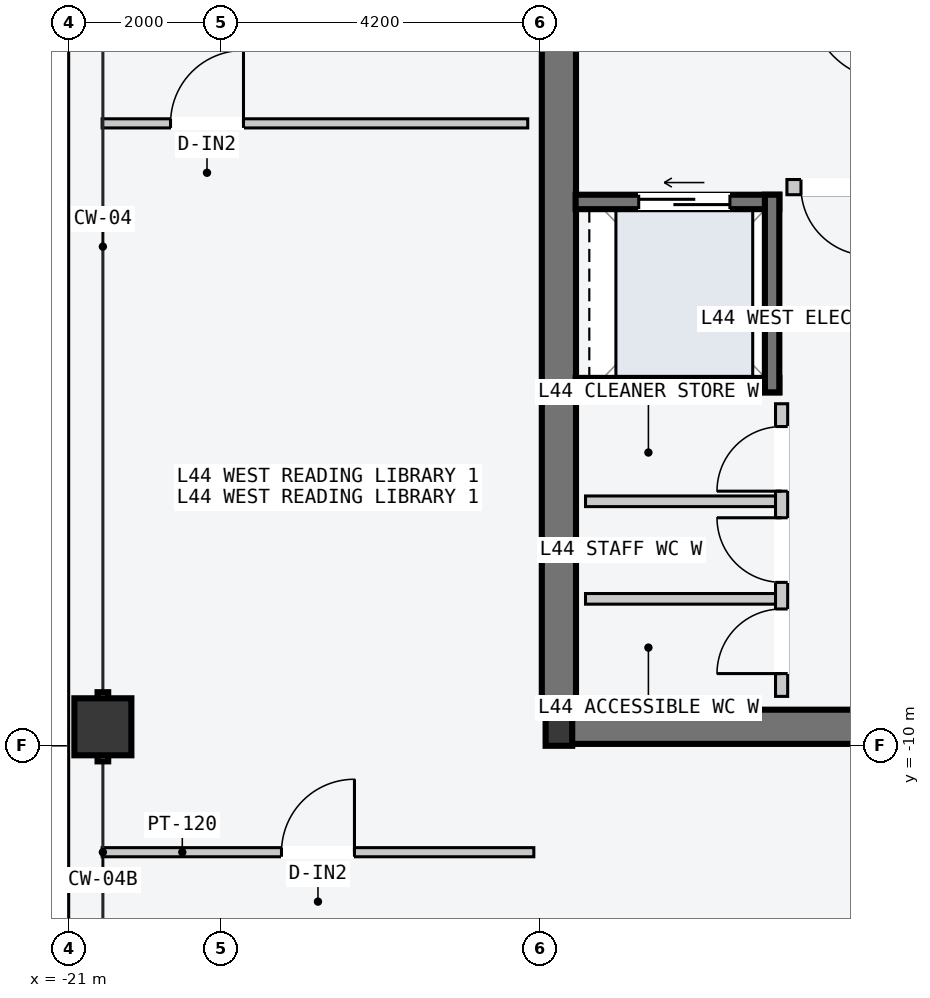
"""IFC4 building model, lengths in metres.
Left out: names, types, materials, properties, quantities, classifications, styles, units other than length and angle.
Written with IfcOpenShell. Run it as: python <this file> out.ifc"""

import sys

from ifc_helpers import new_model, si_unit, direction, frame, frame_2d, origin, origin_2d, place, context, subcontext, project, spatial, rectangle, hollow_rectangle, i_section, extrude, element, fill, save


model = new_model("IFC4")
c1 = context("Model", 3, precision=1e-05, world=origin(), true_north=direction((0.0, 1.0)))
c2 = subcontext(c1, "Body", "Model", "MODEL_VIEW")
j1 = project(units=[si_unit("LENGTHUNIT", "METRE"), si_unit("PLANEANGLEUNIT", "RADIAN")], contexts=[c1])
p1 = place(None, origin())
s1 = spatial("IfcSite", under=j1, at=p1, CompositionType="ELEMENT")
p2 = place(p1, origin())
s2 = spatial("IfcBuilding", under=s1, at=p2, CompositionType="ELEMENT")
p3 = place(p2, frame((0.0, 0.0, 169.5)))
s3 = spatial("IfcBuildingStorey", under=s2, at=p3, CompositionType="ELEMENT", Elevation=169.5)
p4 = place(p3, frame((-14.53, -9.75, -0.2), z_axis=(0.0, 0.0, 1.0), x_axis=(1.0, 0.0, 0.0)))
e1 = element("IfcWall", 1, at=p4, inside=s3, PredefinedType="SHEAR", context=c2, shape_type="SweptSolid", body=[
    extrude(rectangle(XDim=6.46, YDim=0.45, at=frame_2d((3.23, 0.0))), origin(), (0.0, 0.0, 1.0), 3.6),
])
p5 = place(p3, frame((-14.55, -9.5, -0.2), z_axis=(0.0, 0.0, 1.0), x_axis=(0.0, 1.0, 0.0)))
e2 = element("IfcWall", 2, at=p5, inside=s3, PredefinedType="SHEAR", context=c2, shape_type="SweptSolid", body=[
    extrude(rectangle(XDim=9.25, YDim=0.45, at=frame_2d((4.625, 0.0))), origin(), (0.0, 0.0, 1.0), 3.6),
])
p6 = place(p3, frame((-14.55, -9.75, 0.0), z_axis=(0.0, 0.0, 1.0), x_axis=(1.0, 0.0, 0.0)))
e3 = element("IfcColumn", 3, at=p6, inside=s3, PredefinedType="COLUMN", context=c2, shape_type="SweptSolid", body=[
    extrude(i_section(OverallWidth=0.35, OverallDepth=0.5, WebThickness=0.02, FlangeThickness=0.032, at=origin_2d()), origin(), (0.0, 0.0, 1.0), 3.6),
])
p7 = place(p3, frame((-20.55, -9.75, 0.0), z_axis=(0.0, 0.0, 1.0), x_axis=(0.0, 1.0, 0.0)))
e4 = element("IfcColumn", 4, at=p7, inside=s3, PredefinedType="COLUMN", context=c2, shape_type="SweptSolid", body=[
    extrude(hollow_rectangle(XDim=0.75, YDim=0.75, WallThickness=0.032, at=origin_2d()), origin(), (0.0, 0.0, 1.0), 3.6),
])
p8 = place(p3, frame((-14.33, -2.845, -0.2), z_axis=(0.0, 0.0, 1.0), x_axis=(1.0, 0.0, 0.0)))
e5 = element("IfcWall", 5, at=p8, inside=s3, PredefinedType="SOLIDWALL", context=c2, shape_type="SweptSolid", body=[
    extrude(rectangle(XDim=2.68, YDim=0.19, at=frame_2d((1.34, 0.0))), origin(), (0.0, 0.0, 1.0), 3.6),
])
p9 = place(p8, frame((0.83, 0.0, 0.2)))
e6 = element("IfcOpeningElement", 6, at=p9, cuts=e5, PredefinedType="OPENING", context=c2, shape_type="SweptSolid", body=[
    extrude(rectangle(XDim=1.2, YDim=2.2, at=frame_2d((0.6, 1.1))), frame((0.0, 0.105, 0.0), z_axis=(0.0, -1.0, 0.0), x_axis=(1.0, 0.0, 0.0)), (0.0, 0.0, 1.0), 0.21),
])
p10 = place(p3, frame((-14.33, -5.255, -0.2), z_axis=(0.0, 0.0, 1.0), x_axis=(1.0, 0.0, 0.0)))
e7 = element("IfcWall", 7, at=p10, inside=s3, PredefinedType="SOLIDWALL", context=c2, shape_type="SweptSolid", body=[
    extrude(rectangle(XDim=2.68, YDim=0.19, at=frame_2d((1.34, 0.0))), origin(), (0.0, 0.0, 1.0), 3.6),
])
p11 = place(p3, frame((-11.745, -5.35, -0.2), z_axis=(0.0, 0.0, 1.0), x_axis=(0.0, 1.0, 0.0)))
e8 = element("IfcWall", 8, at=p11, inside=s3, PredefinedType="SOLIDWALL", context=c2, shape_type="SweptSolid", body=[
    extrude(rectangle(XDim=2.6, YDim=0.19, at=frame_2d((1.3, 0.0))), origin(), (0.0, 0.0, 1.0), 3.6),
])
p12 = place(p3, frame((-10.28, -2.65, 0.0), z_axis=(0.0, 0.0, 1.0), x_axis=(-1.0, 0.0, 0.0)))
e9 = element("IfcWall", 9, at=p12, inside=s3, PredefinedType="PARTITIONING", context=c2, shape_type="SweptSolid", body=[
    extrude(rectangle(XDim=1.27, YDim=0.2, at=frame_2d((0.635, 0.0))), origin(), (0.0, 0.0, 1.0), 3.4),
])
p13 = place(p12, frame((0.185, 0.0, 0.0)))
e10 = element("IfcOpeningElement", 10, at=p13, cuts=e9, PredefinedType="OPENING", context=c2, shape_type="SweptSolid", body=[
    extrude(rectangle(XDim=0.9, YDim=2.15, at=frame_2d((0.45, 1.075))), frame((0.0, 0.11, 0.0), z_axis=(0.0, -1.0, 0.0), x_axis=(1.0, 0.0, 0.0)), (0.0, 0.0, 1.0), 0.22),
])
for number, where, z_axis, x_axis in (
    (11, (-11.7, -8.067, 0.0), (0.0, 0.0, 1.0), (-1.0, 0.0, 0.0)),
    (12, (-11.7, -6.783, 0.0), (0.0, 0.0, 1.0), (-1.0, 0.0, 0.0)),
):
    element("IfcWall", number, at=place(p3, frame(where, z_axis=z_axis, x_axis=x_axis)), inside=s3, PredefinedType="PARTITIONING", context=c2, shape_type="SweptSolid", body=[
        extrude(rectangle(XDim=2.5, YDim=0.14, at=frame_2d((1.25, 0.0))), origin(), (0.0, 0.0, 1.0), 3.4),
    ])
p14 = place(p3, frame((-11.62, -9.35, 0.0), z_axis=(0.0, 0.0, 1.0), x_axis=(0.0, 1.0, 0.0)))
e13 = element("IfcWall", 13, at=p14, inside=s3, PredefinedType="PARTITIONING", context=c2, shape_type="SweptSolid", body=[
    extrude(rectangle(XDim=3.85, YDim=0.16, at=frame_2d((1.925, 0.0))), origin(), (0.0, 0.0, 1.0), 3.4),
])
p15 = place(p14, frame((0.3, 0.0, 0.0)))
e14 = element("IfcOpeningElement", 14, at=p15, cuts=e13, PredefinedType="OPENING", context=c2, shape_type="SweptSolid", body=[
    extrude(rectangle(XDim=0.85, YDim=2.12, at=frame_2d((0.425, 1.06))), frame((0.0, 0.09, 0.0), z_axis=(0.0, -1.0, 0.0), x_axis=(1.0, 0.0, 0.0)), (0.0, 0.0, 1.0), 0.18),
])
p16 = place(p14, frame((1.5, 0.0, 0.0)))
e15 = element("IfcOpeningElement", 15, at=p16, cuts=e13, PredefinedType="OPENING", context=c2, shape_type="SweptSolid", body=[
    extrude(rectangle(XDim=0.85, YDim=2.12, at=frame_2d((0.425, 1.06))), frame((0.0, 0.09, 0.0), z_axis=(0.0, -1.0, 0.0), x_axis=(1.0, 0.0, 0.0)), (0.0, 0.0, 1.0), 0.18),
])
p17 = place(p14, frame((2.7, 0.0, 0.0)))
e16 = element("IfcOpeningElement", 16, at=p17, cuts=e13, PredefinedType="OPENING", context=c2, shape_type="SweptSolid", body=[
    extrude(rectangle(XDim=0.85, YDim=2.12, at=frame_2d((0.425, 1.06))), frame((0.0, 0.09, 0.0), z_axis=(0.0, -1.0, 0.0), x_axis=(1.0, 0.0, 0.0)), (0.0, 0.0, 1.0), 0.18),
])
p18 = place(p3, frame((-20.56, -11.4, 0.0), z_axis=(0.0, 0.0, 1.0), x_axis=(1.0, 0.0, 0.0)))
e17 = element("IfcWall", 17, at=p18, inside=s3, PredefinedType="PARTITIONING", context=c2, shape_type="SweptSolid", body=[
    extrude(rectangle(XDim=5.68, YDim=0.12, at=frame_2d((2.84, 0.0))), origin(), (0.0, 0.0, 1.0), 3.4),
])
p19 = place(p18, frame((2.36, 0.0, 0.0)))
e18 = element("IfcOpeningElement", 18, at=p19, cuts=e17, PredefinedType="OPENING", context=c2, shape_type="SweptSolid", body=[
    extrude(rectangle(XDim=0.96, YDim=2.18, at=frame_2d((0.48, 1.09))), frame((0.0, 0.07, 0.0), z_axis=(0.0, -1.0, 0.0), x_axis=(1.0, 0.0, 0.0)), (0.0, 0.0, 1.0), 0.14),
])
p20 = place(p3, frame((-20.56, -1.811, 0.0), z_axis=(0.0, 0.0, 1.0), x_axis=(1.0, 0.0, 0.0)))
e19 = element("IfcWall", 19, at=p20, inside=s3, PredefinedType="PARTITIONING", context=c2, shape_type="SweptSolid", body=[
    extrude(rectangle(XDim=5.6, YDim=0.12, at=frame_2d((2.8, 0.0))), origin(), (0.0, 0.0, 1.0), 3.4),
])
p21 = place(p20, frame((0.9, 0.0, 0.0)))
e20 = element("IfcOpeningElement", 20, at=p21, cuts=e19, PredefinedType="OPENING", context=c2, shape_type="SweptSolid", body=[
    extrude(rectangle(XDim=0.96, YDim=2.18, at=frame_2d((0.48, 1.09))), frame((0.0, 0.07, 0.0), z_axis=(0.0, -1.0, 0.0), x_axis=(1.0, 0.0, 0.0)), (0.0, 0.0, 1.0), 0.14),
])
p22 = place(p9, origin())
e21 = element("IfcDoor", 21, at=p22, inside=s3, OperationType="SLIDING_TO_LEFT", PredefinedType="DOOR", context=c2, shape_type="SweptSolid", body=[
    extrude(rectangle(XDim=1.2, YDim=2.2, at=frame_2d((0.6, 1.1))), frame((0.0, 0.025, 0.0), z_axis=(0.0, -1.0, 0.0), x_axis=(1.0, 0.0, 0.0)), (0.0, 0.0, 1.0), 0.05),
])
fill(e6, e21)
p23 = place(p13, origin())
e22 = element("IfcDoor", 22, at=p23, inside=s3, OperationType="SINGLE_SWING_LEFT", PredefinedType="DOOR", context=c2, shape_type="SweptSolid", body=[
    extrude(rectangle(XDim=0.9, YDim=2.15, at=frame_2d((0.45, 1.075))), frame((0.0, 0.025, 0.0), z_axis=(0.0, -1.0, 0.0), x_axis=(1.0, 0.0, 0.0)), (0.0, 0.0, 1.0), 0.05),
])
fill(e10, e22)
p24 = place(p15, origin())
e23 = element("IfcDoor", 23, at=p24, inside=s3, OperationType="SINGLE_SWING_LEFT", PredefinedType="DOOR", context=c2, shape_type="SweptSolid", body=[
    extrude(rectangle(XDim=0.85, YDim=2.12, at=frame_2d((0.425, 1.06))), frame((0.0, 0.025, 0.0), z_axis=(0.0, -1.0, 0.0), x_axis=(1.0, 0.0, 0.0)), (0.0, 0.0, 1.0), 0.05),
])
fill(e14, e23)
p25 = place(p16, origin())
e24 = element("IfcDoor", 24, at=p25, inside=s3, OperationType="SINGLE_SWING_RIGHT", PredefinedType="DOOR", context=c2, shape_type="SweptSolid", body=[
    extrude(rectangle(XDim=0.85, YDim=2.12, at=frame_2d((0.425, 1.06))), frame((0.0, 0.025, 0.0), z_axis=(0.0, -1.0, 0.0), x_axis=(1.0, 0.0, 0.0)), (0.0, 0.0, 1.0), 0.05),
])
fill(e15, e24)
p26 = place(p17, origin())
e25 = element("IfcDoor", 25, at=p26, inside=s3, OperationType="SINGLE_SWING_LEFT", PredefinedType="DOOR", context=c2, shape_type="SweptSolid", body=[
    extrude(rectangle(XDim=0.85, YDim=2.12, at=frame_2d((0.425, 1.06))), frame((0.0, 0.025, 0.0), z_axis=(0.0, -1.0, 0.0), x_axis=(1.0, 0.0, 0.0)), (0.0, 0.0, 1.0), 0.05),
])
fill(e16, e25)
p27 = place(p19, origin())
e26 = element("IfcDoor", 26, at=p27, inside=s3, OperationType="SINGLE_SWING_RIGHT", PredefinedType="DOOR", context=c2, shape_type="SweptSolid", body=[
    extrude(rectangle(XDim=0.96, YDim=2.18, at=frame_2d((0.48, 1.09))), frame((0.0, 0.025, 0.0), z_axis=(0.0, -1.0, 0.0), x_axis=(1.0, 0.0, 0.0)), (0.0, 0.0, 1.0), 0.05),
])
fill(e18, e26)
p28 = place(p21, origin())
e27 = element("IfcDoor", 27, at=p28, inside=s3, OperationType="SINGLE_SWING_RIGHT", PredefinedType="DOOR", context=c2, shape_type="SweptSolid", body=[
    extrude(rectangle(XDim=0.96, YDim=2.18, at=frame_2d((0.48, 1.09))), frame((0.0, 0.025, 0.0), z_axis=(0.0, -1.0, 0.0), x_axis=(1.0, 0.0, 0.0)), (0.0, 0.0, 1.0), 0.05),
])
fill(e20, e27)
save(model, sys.argv[1])
